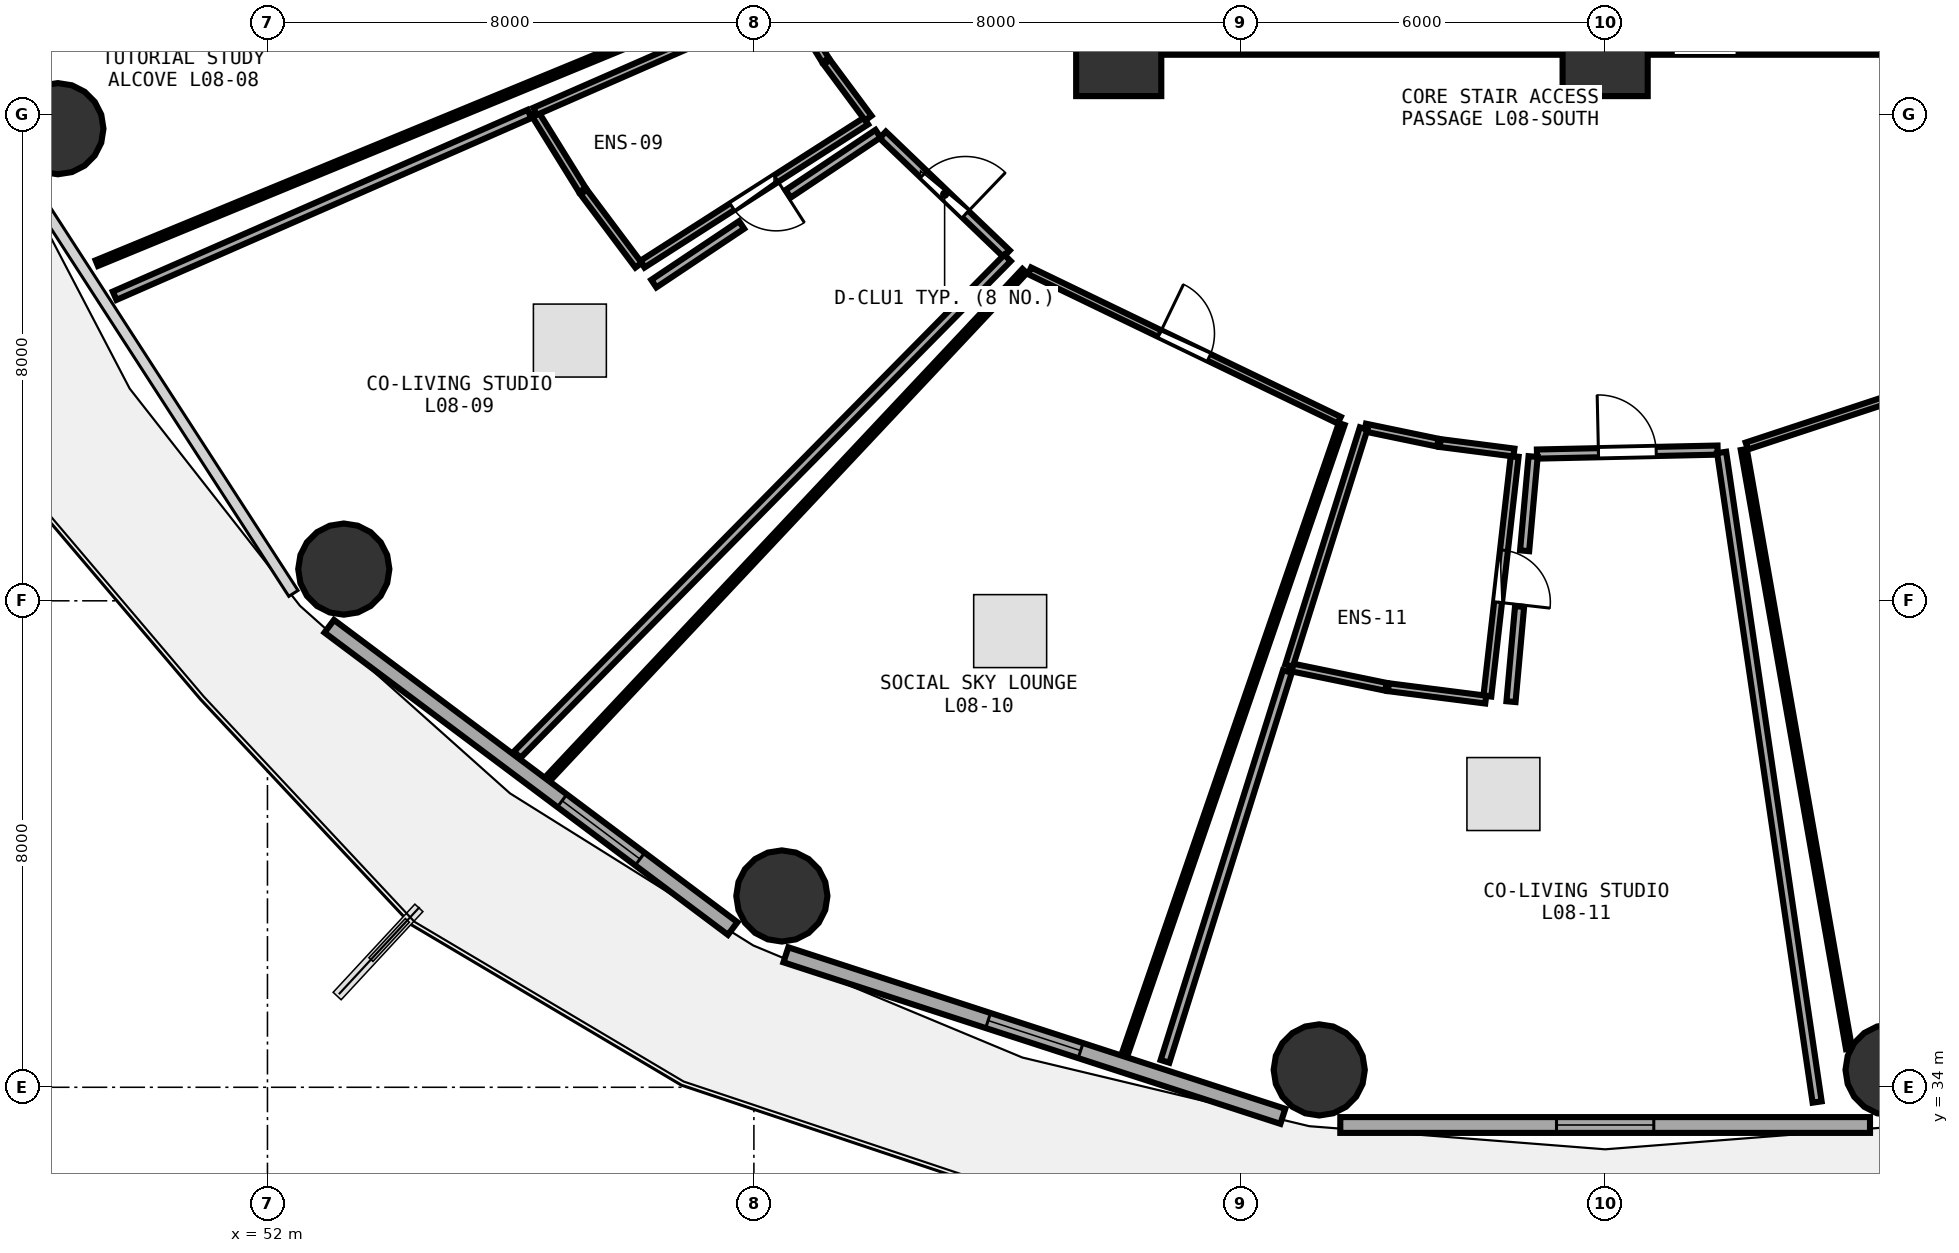
"""IFC4 building model, lengths in metres.
Left out: names, types, materials, properties, quantities, classifications, styles, units other than length and angle.
Written with IfcOpenShell. Run it as: python <this file> out.ifc"""

import sys

from ifc_helpers import new_model, si_unit, direction, frame, frame_2d, origin, origin_2d, place, context, subcontext, project, spatial, rectangle, circle, extrude, element, fill, save


model = new_model("IFC4")
c1 = context("Model", 3, precision=1e-05, world=origin(), true_north=direction((0.0, 1.0)))
c2 = subcontext(c1, "Body", "Model", "MODEL_VIEW")
j1 = project(units=[si_unit("LENGTHUNIT", "METRE"), si_unit("PLANEANGLEUNIT", "RADIAN")], contexts=[c1])
p1 = place(None, origin())
s1 = spatial("IfcSite", under=j1, at=p1, CompositionType="ELEMENT")
p2 = place(p1, origin())
s2 = spatial("IfcBuilding", under=s1, at=p2, CompositionType="ELEMENT")
p3 = place(p2, frame((0.0, 0.0, 33.75)))
s3 = spatial("IfcBuildingStorey", under=s2, at=p3, CompositionType="ELEMENT", Elevation=33.75)
for number, where, z_axis, x_axis in (
    (1, (66.0, 51.0, 0.0), (0.0, 0.0, 1.0), (1.0, 0.0, 0.0)),
    (2, (74.0, 51.0, 0.0), (0.0, 0.0, 1.0), (1.0, 0.0, 0.0)),
):
    element("IfcColumn", number, at=place(p3, frame(where, z_axis=z_axis, x_axis=x_axis)), inside=s3, PredefinedType="PILASTER", context=c2, shape_type="SweptSolid", body=[
        extrude(rectangle(XDim=1.4, YDim=1.4, at=origin_2d()), origin(), (0.0, 0.0, 1.0), 3.75),
    ])
for number, where, z_axis, x_axis in (
    (3, (48.553, 49.764, 0.0), (0.0, 0.0, 1.0), (1.0, 0.0, 0.0)),
    (4, (53.256, 42.522, 0.0), (0.0, 0.0, 1.0), (1.0, 0.0, 0.0)),
    (5, (60.46, 37.146, 0.0), (0.0, 0.0, 1.0), (1.0, 0.0, 0.0)),
    (6, (69.298, 34.286, 0.0), (0.0, 0.0, 1.0), (1.0, 0.0, 0.0)),
    (7, (78.702, 34.286, 0.0), (0.0, 0.0, 1.0), (1.0, 0.0, 0.0)),
):
    element("IfcColumn", number, at=place(p3, frame(where, z_axis=z_axis, x_axis=x_axis)), inside=s3, PredefinedType="COLUMN", context=c2, shape_type="SweptSolid", body=[
        extrude(circle(Radius=0.75, at=origin_2d()), origin(), (0.0, 0.0, 1.0), 3.75),
    ])
p4 = place(p3, frame((53.016, 41.582, 0.0), z_axis=(0.0, 0.0, 1.0), x_axis=(0.80030733173, -0.599590005569, 0.0)))
e8 = element("IfcWall", 8, at=p4, inside=s3, PredefinedType="SOLIDWALL", context=c2, shape_type="SweptSolid", body=[
    extrude(rectangle(XDim=8.291, YDim=0.26, at=frame_2d((4.145, 0.0))), origin(), (0.0, 0.0, 1.0), 3.475),
])
p5 = place(p4, frame((4.785, 0.0, 0.85)))
e9 = element("IfcOpeningElement", 9, at=p5, cuts=e8, PredefinedType="OPENING", context=c2, shape_type="SweptSolid", body=[
    extrude(rectangle(XDim=1.6, YDim=1.45, at=frame_2d((0.8, 0.725))), frame((0.0, 0.14, 0.0), z_axis=(0.0, -1.0, 0.0), x_axis=(1.0, 0.0, 0.0)), (0.0, 0.0, 1.0), 0.28),
])
p6 = place(p3, frame((60.526, 36.178, 0.0), z_axis=(0.0, 0.0, 1.0), x_axis=(0.951039914291, -0.309068085421, 0.0)))
e10 = element("IfcWall", 10, at=p6, inside=s3, PredefinedType="SOLIDWALL", context=c2, shape_type="SweptSolid", body=[
    extrude(rectangle(XDim=8.594, YDim=0.26, at=frame_2d((4.297, 0.0))), origin(), (0.0, 0.0, 1.0), 3.475),
])
p7 = place(p6, frame((3.497, 0.0, 0.85)))
e11 = element("IfcOpeningElement", 11, at=p7, cuts=e10, PredefinedType="OPENING", context=c2, shape_type="SweptSolid", body=[
    extrude(rectangle(XDim=1.6, YDim=1.45, at=frame_2d((0.8, 0.725))), frame((0.0, 0.14, 0.0), z_axis=(0.0, -1.0, 0.0), x_axis=(1.0, 0.0, 0.0)), (0.0, 0.0, 1.0), 0.28),
])
p8 = place(p3, frame((69.644, 33.38, 0.0), z_axis=(0.0, 0.0, 1.0), x_axis=(1.0, 0.0, 0.0)))
e12 = element("IfcWall", 12, at=p8, inside=s3, PredefinedType="SOLIDWALL", context=c2, shape_type="SweptSolid", body=[
    extrude(rectangle(XDim=8.712, YDim=0.26, at=frame_2d((4.356, 0.0))), origin(), (0.0, 0.0, 1.0), 3.475),
])
p9 = place(p8, frame((3.556, 0.0, 0.85)))
e13 = element("IfcOpeningElement", 13, at=p9, cuts=e12, PredefinedType="OPENING", context=c2, shape_type="SweptSolid", body=[
    extrude(rectangle(XDim=1.6, YDim=1.45, at=frame_2d((0.8, 0.725))), frame((0.0, 0.14, 0.0), z_axis=(0.0, -1.0, 0.0), x_axis=(1.0, 0.0, 0.0)), (0.0, 0.0, 1.0), 0.28),
])
p10 = place(p3, frame((74.0, 51.08, 0.0), z_axis=(0.0, 0.0, 1.0), x_axis=(1.0, 0.0, 0.0)))
e14 = element("IfcWall", 14, at=p10, inside=s3, PredefinedType="SHEAR", context=c2, shape_type="SweptSolid", body=[
    extrude(rectangle(XDim=7.9, YDim=0.2, at=frame_2d((3.95, 0.0))), origin(), (0.0, 0.0, 1.0), 3.49),
])
p11 = place(p10, frame((1.12, 0.0, 0.0)))
e15 = element("IfcOpeningElement", 15, at=p11, cuts=e14, PredefinedType="OPENING", context=c2, shape_type="SweptSolid", body=[
    extrude(rectangle(XDim=1.05, YDim=2.1, at=frame_2d((0.525, 1.05))), frame((0.0, 0.11, 0.0), z_axis=(0.0, -1.0, 0.0), x_axis=(1.0, 0.0, 0.0)), (0.0, 0.0, 1.0), 0.22),
])
p12 = place(p3, frame((66.26, 51.08, 0.0), z_axis=(0.0, 0.0, 1.0), x_axis=(1.0, 0.0, 0.0)))
e16 = element("IfcWall", 16, at=p12, inside=s3, PredefinedType="SHEAR", context=c2, shape_type="SweptSolid", body=[
    extrude(rectangle(XDim=7.16, YDim=0.2, at=frame_2d((3.58, 0.0))), origin(), (0.0, 0.0, 1.0), 3.49),
])
p13 = place(p3, frame((61.844, 49.89, 0.0), z_axis=(0.0, 0.0, 1.0), x_axis=(-0.842235862163, -0.539109221297, 0.0)))
e17 = element("IfcWall", 17, at=p13, inside=s3, PredefinedType="PLUMBINGWALL", context=c2, shape_type="SweptSolid", body=[
    extrude(rectangle(XDim=4.367, YDim=0.13, at=frame_2d((2.184, 0.0))), origin(), (0.0, 0.0, 1.0), 3.235),
])
p14 = place(p13, frame((1.754, 0.0, 0.0)))
e18 = element("IfcOpeningElement", 18, at=p14, cuts=e17, PredefinedType="OPENING", context=c2, shape_type="SweptSolid", body=[
    extrude(rectangle(XDim=0.86, YDim=2.05, at=frame_2d((0.43, 1.025))), frame((0.0, 0.075, 0.0), z_axis=(0.0, -1.0, 0.0), x_axis=(1.0, 0.0, 0.0)), (0.0, 0.0, 1.0), 0.15),
])
p15 = place(p3, frame((62.118, 49.663, 0.0), z_axis=(0.0, 0.0, 1.0), x_axis=(0.721698326825, -0.692207718144, 0.0)))
e19 = element("IfcWall", 19, at=p15, inside=s3, PredefinedType="PARTITIONING", context=c2, shape_type="SweptSolid", body=[
    extrude(rectangle(XDim=2.823, YDim=0.15, at=frame_2d((1.412, 0.0))), origin(), (0.0, 0.0, 1.0), 2.875),
])
p16 = place(p15, frame((0.936, 0.0, 0.0)))
e20 = element("IfcOpeningElement", 20, at=p16, cuts=e19, PredefinedType="OPENING", context=c2, shape_type="SweptSolid", body=[
    extrude(rectangle(XDim=0.95, YDim=2.08, at=frame_2d((0.475, 1.04))), frame((0.0, 0.085, 0.0), z_axis=(0.0, -1.0, 0.0), x_axis=(1.0, 0.0, 0.0)), (0.0, 0.0, 1.0), 0.17),
])
p17 = place(p3, frame((64.534, 47.427, 0.0), z_axis=(0.0, 0.0, 1.0), x_axis=(0.900751487373, -0.434334845477, 0.0)))
e21 = element("IfcWall", 21, at=p17, inside=s3, PredefinedType="PARTITIONING", context=c2, shape_type="SweptSolid", body=[
    extrude(rectangle(XDim=5.654, YDim=0.12, at=frame_2d((2.827, 0.0))), origin(), (0.0, 0.0, 1.0), 2.875),
])
p18 = place(p17, frame((2.377, 0.0, 0.0)))
e22 = element("IfcOpeningElement", 22, at=p18, cuts=e21, PredefinedType="OPENING", context=c2, shape_type="SweptSolid", body=[
    extrude(rectangle(XDim=0.9, YDim=2.08, at=frame_2d((0.45, 1.04))), frame((0.0, 0.07, 0.0), z_axis=(0.0, -1.0, 0.0), x_axis=(1.0, 0.0, 0.0)), (0.0, 0.0, 1.0), 0.14),
])
p19 = place(p3, frame((72.512, 44.376, 0.0), z_axis=(0.0, 0.0, 1.0), x_axis=(-0.113232612293, -0.993568505697, 0.0)))
e23 = element("IfcWall", 23, at=p19, inside=s3, PredefinedType="PLUMBINGWALL", context=c2, shape_type="SweptSolid", body=[
    extrude(rectangle(XDim=3.969, YDim=0.13, at=frame_2d((1.985, 0.0))), origin(), (0.0, 0.0, 1.0), 3.175),
])
p20 = place(p19, frame((1.555, 0.0, 0.0)))
e24 = element("IfcOpeningElement", 24, at=p20, cuts=e23, PredefinedType="OPENING", context=c2, shape_type="SweptSolid", body=[
    extrude(rectangle(XDim=0.86, YDim=2.05, at=frame_2d((0.43, 1.025))), frame((0.0, 0.075, 0.0), z_axis=(0.0, -1.0, 0.0), x_axis=(1.0, 0.0, 0.0)), (0.0, 0.0, 1.0), 0.15),
])
p21 = place(p3, frame((72.879, 44.413, 0.0), z_axis=(0.0, 0.0, 1.0), x_axis=(0.999757617916, 0.022016026426, 0.0)))
e25 = element("IfcWall", 25, at=p21, inside=s3, PredefinedType="PARTITIONING", context=c2, shape_type="SweptSolid", body=[
    extrude(rectangle(XDim=2.972, YDim=0.15, at=frame_2d((1.486, 0.0))), origin(), (0.0, 0.0, 1.0), 3.48),
])
p22 = place(p21, frame((1.011, 0.0, 0.0)))
e26 = element("IfcOpeningElement", 26, at=p22, cuts=e25, PredefinedType="OPENING", context=c2, shape_type="SweptSolid", body=[
    extrude(rectangle(XDim=0.95, YDim=2.08, at=frame_2d((0.475, 1.04))), frame((0.0, 0.085, 0.0), z_axis=(0.0, -1.0, 0.0), x_axis=(1.0, 0.0, 0.0)), (0.0, 0.0, 1.0), 0.17),
])
p23 = place(p3, frame((76.33, 44.546, 0.0), z_axis=(0.0, 0.0, 1.0), x_axis=(0.949607265123, 0.313442246716, 0.0)))
e27 = element("IfcWall", 27, at=p23, inside=s3, PredefinedType="PARTITIONING", context=c2, shape_type="SweptSolid", body=[
    extrude(rectangle(XDim=5.708, YDim=0.12, at=frame_2d((2.854, 0.0))), origin(), (0.0, 0.0, 1.0), 2.875),
])
p24 = place(p23, frame((2.404, 0.0, 0.0)))
e28 = element("IfcOpeningElement", 28, at=p24, cuts=e27, PredefinedType="OPENING", context=c2, shape_type="SweptSolid", body=[
    extrude(rectangle(XDim=0.9, YDim=2.08, at=frame_2d((0.45, 1.04))), frame((0.0, 0.07, 0.0), z_axis=(0.0, -1.0, 0.0), x_axis=(1.0, 0.0, 0.0)), (0.0, 0.0, 1.0), 0.14),
])
p25 = place(p3, frame((60.375, 52.16, 0.0), z_axis=(0.0, 0.0, 1.0), x_axis=(-0.924608681042, -0.380918346817, 0.0)))
e29 = element("IfcWall", 29, at=p25, inside=s3, PredefinedType="PARTITIONING", context=c2, shape_type="SweptSolid", body=[
    extrude(rectangle(XDim=12.094, YDim=0.1, at=frame_2d((6.047, 0.0))), origin(), (0.0, 0.0, 1.0), 2.875),
])
p26 = place(p3, frame((60.583, 51.859, 0.0), z_axis=(0.0, 0.0, 1.0), x_axis=(0.52310141153, -0.852270446077, 0.0)))
e30 = element("IfcWall", 30, at=p26, inside=s3, PredefinedType="PLUMBINGWALL", context=c2, shape_type="SweptSolid", body=[
    extrude(rectangle(XDim=1.135, YDim=0.13, at=frame_2d((0.568, 0.0))), origin(), (0.0, 0.0, 1.0), 3.48),
])
p27 = place(p3, frame((61.2, 50.858, 0.0), z_axis=(0.0, 0.0, 1.0), x_axis=(0.595625136946, -0.803262532574, 0.0)))
e31 = element("IfcWall", 31, at=p27, inside=s3, PredefinedType="PLUMBINGWALL", context=c2, shape_type="SweptSolid", body=[
    extrude(rectangle(XDim=1.145, YDim=0.13, at=frame_2d((0.573, 0.0))), origin(), (0.0, 0.0, 1.0), 2.875),
])
p28 = place(p3, frame((58.103, 47.519, 0.0), z_axis=(0.0, 0.0, 1.0), x_axis=(-0.599662382917, 0.800253101533, 0.0)))
e32 = element("IfcWall", 32, at=p28, inside=s3, PredefinedType="PLUMBINGWALL", context=c2, shape_type="SweptSolid", body=[
    extrude(rectangle(XDim=1.504, YDim=0.13, at=frame_2d((0.752, 0.0))), origin(), (0.0, 0.0, 1.0), 3.48),
])
p29 = place(p3, frame((57.178, 48.756, 0.0), z_axis=(0.0, 0.0, 1.0), x_axis=(-0.526861637299, 0.849951066323, 0.0)))
e33 = element("IfcWall", 33, at=p29, inside=s3, PredefinedType="PLUMBINGWALL", context=c2, shape_type="SweptSolid", body=[
    extrude(rectangle(XDim=1.492, YDim=0.13, at=frame_2d((0.746, 0.0))), origin(), (0.0, 0.0, 1.0), 3.48),
])
p30 = place(p3, frame((56.4, 50.049, 0.0), z_axis=(0.0, 0.0, 1.0), x_axis=(0.91604857307, 0.401067340701, 0.0)))
e34 = element("IfcWall", 34, at=p30, inside=s3, PredefinedType="PLUMBINGWALL", context=c2, shape_type="SweptSolid", body=[
    extrude(rectangle(XDim=4.535, YDim=0.13, at=frame_2d((2.268, 0.0))), origin(), (0.0, 0.0, 1.0), 2.875),
])
p31 = place(p3, frame((64.171, 47.638, 0.0), z_axis=(0.0, 0.0, 1.0), x_axis=(-0.702465266663, -0.711718026421, 0.0)))
e35 = element("IfcWall", 35, at=p31, inside=s3, PredefinedType="PARTITIONING", context=c2, shape_type="SweptSolid", body=[
    extrude(rectangle(XDim=11.478, YDim=0.15, at=frame_2d((5.739, 0.0))), origin(), (0.0, 0.0, 1.0), 2.875),
])
p32 = place(p3, frame((49.487, 47.017, 0.0), z_axis=(0.0, 0.0, 1.0), x_axis=(0.915920983282, 0.401358633124, 0.0)))
e36 = element("IfcWall", 36, at=p32, inside=s3, PredefinedType="PARTITIONING", context=c2, shape_type="SweptSolid", body=[
    extrude(rectangle(XDim=7.449, YDim=0.15, at=frame_2d((3.725, 0.0))), origin(), (0.0, 0.0, 1.0), 2.875),
])
p33 = place(p3, frame((58.354, 47.216, 0.0), z_axis=(0.0, 0.0, 1.0), x_axis=(0.831292382958, 0.555835383937, 0.0)))
e37 = element("IfcWall", 37, at=p33, inside=s3, PredefinedType="PARTITIONING", context=c2, shape_type="SweptSolid", body=[
    extrude(rectangle(XDim=1.736, YDim=0.15, at=frame_2d((0.868, 0.0))), origin(), (0.0, 0.0, 1.0), 3.48),
])
p34 = place(p3, frame((60.563, 48.693, 0.0), z_axis=(0.0, 0.0, 1.0), x_axis=(0.831268380724, 0.555871279352, 0.0)))
e38 = element("IfcWall", 38, at=p34, inside=s3, PredefinedType="PARTITIONING", context=c2, shape_type="SweptSolid", body=[
    extrude(rectangle(XDim=1.779, YDim=0.15, at=frame_2d((0.89, 0.0))), origin(), (0.0, 0.0, 1.0), 3.235),
])
p35 = place(p3, frame((69.668, 44.907, 0.0), z_axis=(0.0, 0.0, 1.0), x_axis=(-0.325549997896, -0.94552482721, 0.0)))
e39 = element("IfcWall", 39, at=p35, inside=s3, PredefinedType="PARTITIONING", context=c2, shape_type="SweptSolid", body=[
    extrude(rectangle(XDim=10.911, YDim=0.1, at=frame_2d((5.456, 0.0))), origin(), (0.0, 0.0, 1.0), 2.875),
])
p36 = place(p3, frame((56.622, 39.085, 0.0), z_axis=(0.0, 0.0, 1.0), x_axis=(0.684539394854, 0.728975868526, 0.0)))
e40 = element("IfcWall", 40, at=p36, inside=s3, PredefinedType="PARTITIONING", context=c2, shape_type="SweptSolid", body=[
    extrude(rectangle(XDim=11.439, YDim=0.1, at=frame_2d((5.719, 0.0))), origin(), (0.0, 0.0, 1.0), 2.875),
])
p37 = place(p3, frame((70.054, 44.849, 0.0), z_axis=(0.0, 0.0, 1.0), x_axis=(0.979121805859, -0.203274418684, 0.0)))
e41 = element("IfcWall", 41, at=p37, inside=s3, PredefinedType="PLUMBINGWALL", context=c2, shape_type="SweptSolid", body=[
    extrude(rectangle(XDim=1.219, YDim=0.13, at=frame_2d((0.609, 0.0))), origin(), (0.0, 0.0, 1.0), 3.235),
])
p38 = place(p3, frame((71.287, 44.594, 0.0), z_axis=(0.0, 0.0, 1.0), x_axis=(0.991848040681, -0.127426308891, 0.0)))
e42 = element("IfcWall", 42, at=p38, inside=s3, PredefinedType="PLUMBINGWALL", context=c2, shape_type="SweptSolid", body=[
    extrude(rectangle(XDim=1.222, YDim=0.13, at=frame_2d((0.611, 0.0))), origin(), (0.0, 0.0, 1.0), 3.235),
])
p39 = place(p3, frame((72.036, 40.375, 0.0), z_axis=(0.0, 0.0, 1.0), x_axis=(-0.991984482756, 0.126359748222, 0.0)))
e43 = element("IfcWall", 43, at=p39, inside=s3, PredefinedType="PLUMBINGWALL", context=c2, shape_type="SweptSolid", body=[
    extrude(rectangle(XDim=1.615, YDim=0.13, at=frame_2d((0.808, 0.0))), origin(), (0.0, 0.0, 1.0), 3.48),
])
p40 = place(p3, frame((70.394, 40.586, 0.0), z_axis=(0.0, 0.0, 1.0), x_axis=(-0.979464082354, 0.201618727747, 0.0)))
e44 = element("IfcWall", 44, at=p40, inside=s3, PredefinedType="PLUMBINGWALL", context=c2, shape_type="SweptSolid", body=[
    extrude(rectangle(XDim=1.612, YDim=0.13, at=frame_2d((0.806, 0.0))), origin(), (0.0, 0.0, 1.0), 3.175),
])
p41 = place(p3, frame((68.802, 40.934, 0.0), z_axis=(0.0, 0.0, 1.0), x_axis=(0.299913557671, 0.953966381968, 0.0)))
e45 = element("IfcWall", 45, at=p41, inside=s3, PredefinedType="PLUMBINGWALL", context=c2, shape_type="SweptSolid", body=[
    extrude(rectangle(XDim=4.088, YDim=0.13, at=frame_2d((2.044, 0.0))), origin(), (0.0, 0.0, 1.0), 3.175),
])
p42 = place(p3, frame((75.916, 44.44, 0.0), z_axis=(0.0, 0.0, 1.0), x_axis=(0.145430849227, -0.989368418787, 0.0)))
e46 = element("IfcWall", 46, at=p42, inside=s3, PredefinedType="PARTITIONING", context=c2, shape_type="SweptSolid", body=[
    extrude(rectangle(XDim=10.798, YDim=0.15, at=frame_2d((5.399, 0.0))), origin(), (0.0, 0.0, 1.0), 2.875),
])
p43 = place(p3, frame((66.761, 34.426, 0.0), z_axis=(0.0, 0.0, 1.0), x_axis=(0.299536567827, 0.954084820409, 0.0)))
e47 = element("IfcWall", 47, at=p43, inside=s3, PredefinedType="PARTITIONING", context=c2, shape_type="SweptSolid", body=[
    extrude(rectangle(XDim=6.72, YDim=0.15, at=frame_2d((3.36, 0.0))), origin(), (0.0, 0.0, 1.0), 2.875),
])
p44 = place(p3, frame((72.452, 40.342, 0.0), z_axis=(0.0, 0.0, 1.0), x_axis=(0.089821137984, 0.995957912349, 0.0)))
e48 = element("IfcWall", 48, at=p44, inside=s3, PredefinedType="PARTITIONING", context=c2, shape_type="SweptSolid", body=[
    extrude(rectangle(XDim=1.571, YDim=0.15, at=frame_2d((0.786, 0.0))), origin(), (0.0, 0.0, 1.0), 3.175),
])
p45 = place(p3, frame((72.676, 42.823, 0.0), z_axis=(0.0, 0.0, 1.0), x_axis=(0.089927260711, 0.9959483359, 0.0)))
e49 = element("IfcWall", 49, at=p45, inside=s3, PredefinedType="PARTITIONING", context=c2, shape_type="SweptSolid", body=[
    extrude(rectangle(XDim=1.556, YDim=0.15, at=frame_2d((0.778, 0.0))), origin(), (0.0, 0.0, 1.0), 3.48),
])
p46 = place(p3, frame((78.01, 34.635, 0.0), z_axis=(0.0, 0.0, 1.0), x_axis=(-0.173016726169, 0.984918886237, 0.0)))
e50 = element("IfcWall", 50, at=p46, inside=s3, PredefinedType="PARTITIONING", context=c2, shape_type="SweptSolid", body=[
    extrude(rectangle(XDim=10.003, YDim=0.1, at=frame_2d((5.001, 0.0))), origin(), (0.0, 0.0, 1.0), 3.175),
])
p47 = place(p5, origin())
e51 = element("IfcWindow", 51, at=p47, inside=s3, PartitioningType="SINGLE_PANEL", PredefinedType="WINDOW", context=c2, shape_type="SweptSolid", body=[
    extrude(rectangle(XDim=1.6, YDim=1.45, at=frame_2d((0.8, 0.725))), frame((0.0, 0.03, 0.0), z_axis=(0.0, -1.0, 0.0), x_axis=(1.0, 0.0, 0.0)), (0.0, 0.0, 1.0), 0.06),
])
fill(e9, e51)
p48 = place(p7, origin())
e52 = element("IfcWindow", 52, at=p48, inside=s3, PartitioningType="SINGLE_PANEL", PredefinedType="WINDOW", context=c2, shape_type="SweptSolid", body=[
    extrude(rectangle(XDim=1.6, YDim=1.45, at=frame_2d((0.8, 0.725))), frame((0.0, 0.03, 0.0), z_axis=(0.0, -1.0, 0.0), x_axis=(1.0, 0.0, 0.0)), (0.0, 0.0, 1.0), 0.06),
])
fill(e11, e52)
p49 = place(p9, origin())
e53 = element("IfcWindow", 53, at=p49, inside=s3, PartitioningType="SINGLE_PANEL", PredefinedType="WINDOW", context=c2, shape_type="SweptSolid", body=[
    extrude(rectangle(XDim=1.6, YDim=1.45, at=frame_2d((0.8, 0.725))), frame((0.0, 0.03, 0.0), z_axis=(0.0, -1.0, 0.0), x_axis=(1.0, 0.0, 0.0)), (0.0, 0.0, 1.0), 0.06),
])
fill(e13, e53)
p50 = place(p14, origin())
e54 = element("IfcDoor", 54, at=p50, inside=s3, OperationType="SINGLE_SWING_LEFT", PredefinedType="DOOR", context=c2, shape_type="SweptSolid", body=[
    extrude(rectangle(XDim=0.86, YDim=2.05, at=frame_2d((0.43, 1.025))), frame((0.0, 0.025, 0.0), z_axis=(0.0, -1.0, 0.0), x_axis=(1.0, 0.0, 0.0)), (0.0, 0.0, 1.0), 0.05),
])
fill(e18, e54)
p51 = place(p16, origin())
e55 = element("IfcDoor", 55, at=p51, inside=s3, OperationType="SINGLE_SWING_RIGHT", PredefinedType="DOOR", context=c2, shape_type="SweptSolid", body=[
    extrude(rectangle(XDim=0.95, YDim=2.08, at=frame_2d((0.475, 1.04))), frame((0.0, 0.025, 0.0), z_axis=(0.0, -1.0, 0.0), x_axis=(1.0, 0.0, 0.0)), (0.0, 0.0, 1.0), 0.05),
])
fill(e20, e55)
p52 = place(p18, origin())
e56 = element("IfcDoor", 56, at=p52, inside=s3, OperationType="SINGLE_SWING_LEFT", PredefinedType="DOOR", context=c2, shape_type="SweptSolid", body=[
    extrude(rectangle(XDim=0.9, YDim=2.08, at=frame_2d((0.45, 1.04))), frame((0.0, 0.025, 0.0), z_axis=(0.0, -1.0, 0.0), x_axis=(1.0, 0.0, 0.0)), (0.0, 0.0, 1.0), 0.05),
])
fill(e22, e56)
p53 = place(p20, origin())
e57 = element("IfcDoor", 57, at=p53, inside=s3, OperationType="SINGLE_SWING_RIGHT", PredefinedType="DOOR", context=c2, shape_type="SweptSolid", body=[
    extrude(rectangle(XDim=0.86, YDim=2.05, at=frame_2d((0.43, 1.025))), frame((0.0, 0.025, 0.0), z_axis=(0.0, -1.0, 0.0), x_axis=(1.0, 0.0, 0.0)), (0.0, 0.0, 1.0), 0.05),
])
fill(e24, e57)
p54 = place(p22, origin())
e58 = element("IfcDoor", 58, at=p54, inside=s3, OperationType="SINGLE_SWING_LEFT", PredefinedType="DOOR", context=c2, shape_type="SweptSolid", body=[
    extrude(rectangle(XDim=0.95, YDim=2.08, at=frame_2d((0.475, 1.04))), frame((0.0, 0.025, 0.0), z_axis=(0.0, -1.0, 0.0), x_axis=(1.0, 0.0, 0.0)), (0.0, 0.0, 1.0), 0.05),
])
fill(e26, e58)
save(model, sys.argv[1])
